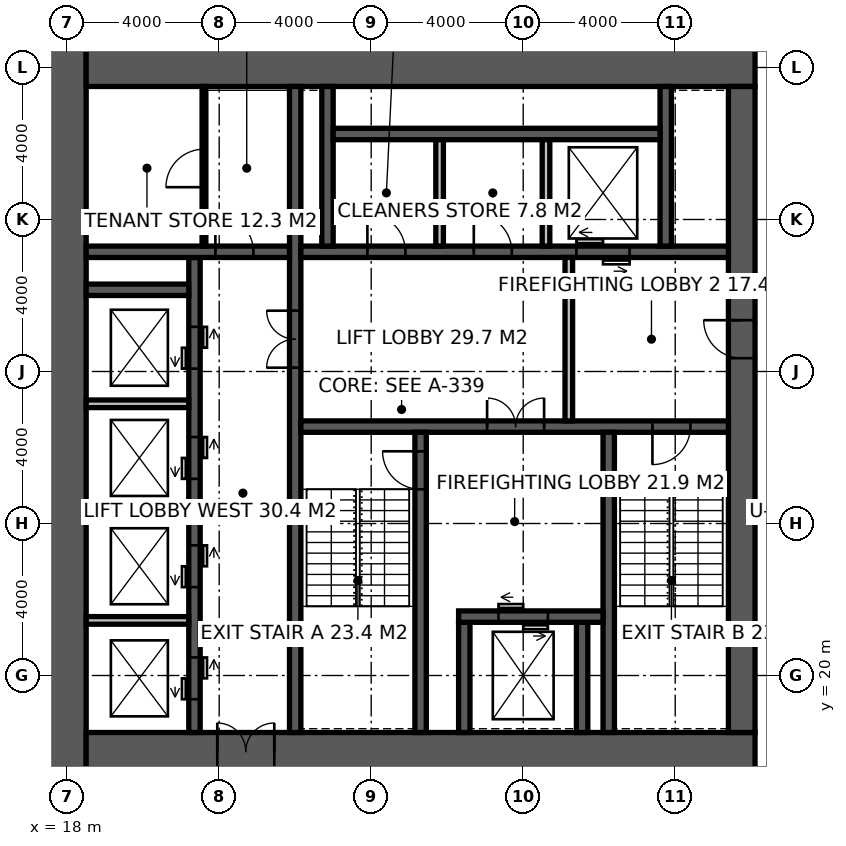
"""IFC4 building model, lengths in metres.
Left out: names, types, materials, properties, quantities, classifications, styles, units other than length and angle.
Written with IfcOpenShell. Run it as: python <this file> out.ifc"""

import sys

from ifc_helpers import new_model, si_unit, direction, frame, frame_2d, origin, place, context, subcontext, project, spatial, rectangle, extrude, element, fill, save


model = new_model("IFC4")
c1 = context("Model", 3, precision=1e-05, world=origin(), true_north=direction((0.0, 1.0)))
c2 = subcontext(c1, "Body", "Model", "MODEL_VIEW")
j1 = project(units=[si_unit("LENGTHUNIT", "METRE"), si_unit("PLANEANGLEUNIT", "RADIAN")], contexts=[c1])
p1 = place(None, origin())
s1 = spatial("IfcSite", under=j1, at=p1, CompositionType="ELEMENT")
p2 = place(p1, origin())
s2 = spatial("IfcBuilding", under=s1, at=p2, CompositionType="ELEMENT")
p3 = place(p2, frame((0.0, 0.0, 242.2)))
s3 = spatial("IfcBuildingStorey", under=s2, at=p3, CompositionType="ELEMENT", Elevation=242.2)
p4 = place(p3, frame((18.0, 17.5, -0.15), z_axis=(0.0, 0.0, 1.0), x_axis=(0.0, 1.0, 0.0)))
e1 = element("IfcWall", 1, at=p4, inside=s3, PredefinedType="SHEAR", context=c2, shape_type="SweptSolid", body=[
    extrude(rectangle(XDim=19.0, YDim=1.0, at=frame_2d((9.5, 0.0))), origin(), (0.0, 0.0, 1.0), 4.0),
])
p5 = place(p3, frame((18.5, 18.0, -0.15), z_axis=(0.0, 0.0, 1.0), x_axis=(1.0, 0.0, 0.0)))
e2 = element("IfcWall", 2, at=p5, inside=s3, PredefinedType="SHEAR", context=c2, shape_type="SweptSolid", body=[
    extrude(rectangle(XDim=17.6, YDim=1.0, at=frame_2d((8.8, 0.0))), origin(), (0.0, 0.0, 1.0), 4.0),
])
p6 = place(p5, frame((3.45, 0.0, 0.15)))
e3 = element("IfcOpeningElement", 3, at=p6, cuts=e2, PredefinedType="OPENING", context=c2, shape_type="SweptSolid", body=[
    extrude(rectangle(XDim=1.5, YDim=2.4, at=frame_2d((0.75, 1.2))), frame((0.0, 0.51, 0.0), z_axis=(0.0, -1.0, 0.0), x_axis=(1.0, 0.0, 0.0)), (0.0, 0.0, 1.0), 1.02),
])
p7 = place(p3, frame((18.5, 36.0, -0.15), z_axis=(0.0, 0.0, 1.0), x_axis=(1.0, 0.0, 0.0)))
e4 = element("IfcWall", 4, at=p7, inside=s3, PredefinedType="SHEAR", context=c2, shape_type="SweptSolid", body=[
    extrude(rectangle(XDim=17.6, YDim=1.0, at=frame_2d((8.8, 0.0))), origin(), (0.0, 0.0, 1.0), 4.0),
])
p8 = place(p3, frame((35.75, 18.5, -0.15), z_axis=(0.0, 0.0, 1.0), x_axis=(0.0, 1.0, 0.0)))
e5 = element("IfcWall", 5, at=p8, inside=s3, PredefinedType="SHEAR", context=c2, shape_type="SweptSolid", body=[
    extrude(rectangle(XDim=17.0, YDim=0.7, at=frame_2d((8.5, 0.0))), origin(), (0.0, 0.0, 1.0), 4.0),
])
p9 = place(p8, frame((9.85, 0.0, 0.15)))
e6 = element("IfcOpeningElement", 6, at=p9, cuts=e5, PredefinedType="OPENING", context=c2, shape_type="SweptSolid", body=[
    extrude(rectangle(XDim=1.0, YDim=2.2, at=frame_2d((0.5, 1.1))), frame((0.0, 0.36, 0.0), z_axis=(0.0, -1.0, 0.0), x_axis=(1.0, 0.0, 0.0)), (0.0, 0.0, 1.0), 0.72),
])
p10 = place(p3, frame((24.0, 18.5, -0.15), z_axis=(0.0, 0.0, 1.0), x_axis=(0.0, 1.0, 0.0)))
e7 = element("IfcWall", 7, at=p10, inside=s3, PredefinedType="SHEAR", context=c2, shape_type="SweptSolid", body=[
    extrude(rectangle(XDim=17.0, YDim=0.3, at=frame_2d((8.5, 0.0))), origin(), (0.0, 0.0, 1.0), 4.0),
])
p11 = place(p10, frame((9.6, 0.0, 0.15)))
e8 = element("IfcOpeningElement", 8, at=p11, cuts=e7, PredefinedType="OPENING", context=c2, shape_type="SweptSolid", body=[
    extrude(rectangle(XDim=1.5, YDim=2.4, at=frame_2d((0.75, 1.2))), frame((0.0, 0.16, 0.0), z_axis=(0.0, -1.0, 0.0), x_axis=(1.0, 0.0, 0.0)), (0.0, 0.0, 1.0), 0.32),
])
p12 = place(p3, frame((24.15, 26.55, -0.15), z_axis=(0.0, 0.0, 1.0), x_axis=(1.0, 0.0, 0.0)))
e9 = element("IfcWall", 9, at=p12, inside=s3, PredefinedType="SHEAR", context=c2, shape_type="SweptSolid", body=[
    extrude(rectangle(XDim=11.25, YDim=0.3, at=frame_2d((5.625, 0.0))), origin(), (0.0, 0.0, 1.0), 4.0),
])
p13 = place(p12, frame((9.25, 0.0, 0.15)))
e10 = element("IfcOpeningElement", 10, at=p13, cuts=e9, PredefinedType="OPENING", context=c2, shape_type="SweptSolid", body=[
    extrude(rectangle(XDim=1.0, YDim=2.2, at=frame_2d((0.5, 1.1))), frame((0.0, 0.16, 0.0), z_axis=(0.0, -1.0, 0.0), x_axis=(1.0, 0.0, 0.0)), (0.0, 0.0, 1.0), 0.32),
])
p14 = place(p12, frame((4.9, 0.0, 0.15)))
e11 = element("IfcOpeningElement", 11, at=p14, cuts=e9, PredefinedType="OPENING", context=c2, shape_type="SweptSolid", body=[
    extrude(rectangle(XDim=1.5, YDim=2.4, at=frame_2d((0.75, 1.2))), frame((0.0, 0.16, 0.0), z_axis=(0.0, -1.0, 0.0), x_axis=(1.0, 0.0, 0.0)), (0.0, 0.0, 1.0), 0.32),
])
p15 = place(p3, frame((27.3, 18.5, -0.15), z_axis=(0.0, 0.0, 1.0), x_axis=(0.0, 1.0, 0.0)))
e12 = element("IfcWall", 12, at=p15, inside=s3, PredefinedType="SHEAR", context=c2, shape_type="SweptSolid", body=[
    extrude(rectangle(XDim=7.9, YDim=0.3, at=frame_2d((3.95, 0.0))), origin(), (0.0, 0.0, 1.0), 4.0),
])
p16 = place(p15, frame((6.4, 0.0, 0.15)))
e13 = element("IfcOpeningElement", 13, at=p16, cuts=e12, PredefinedType="OPENING", context=c2, shape_type="SweptSolid", body=[
    extrude(rectangle(XDim=1.0, YDim=2.2, at=frame_2d((0.5, 1.1))), frame((0.0, 0.16, 0.0), z_axis=(0.0, -1.0, 0.0), x_axis=(1.0, 0.0, 0.0)), (0.0, 0.0, 1.0), 0.32),
])
p17 = place(p3, frame((32.25, 18.5, -0.15), z_axis=(0.0, 0.0, 1.0), x_axis=(0.0, 1.0, 0.0)))
e14 = element("IfcWall", 14, at=p17, inside=s3, PredefinedType="SHEAR", context=c2, shape_type="SweptSolid", body=[
    extrude(rectangle(XDim=7.9, YDim=0.3, at=frame_2d((3.95, 0.0))), origin(), (0.0, 0.0, 1.0), 4.0),
])
for number, where, z_axis, x_axis in (
    (15, (28.45, 18.5, -0.15), (0.0, 0.0, 1.0), (0.0, 1.0, 0.0)),
    (16, (31.55, 18.5, -0.15), (0.0, 0.0, 1.0), (0.0, 1.0, 0.0)),
):
    element("IfcWall", number, at=place(p3, frame(where, z_axis=z_axis, x_axis=x_axis)), inside=s3, PredefinedType="SHEAR", context=c2, shape_type="SweptSolid", body=[
        extrude(rectangle(XDim=2.9, YDim=0.3, at=frame_2d((1.45, 0.0))), origin(), (0.0, 0.0, 1.0), 4.0),
    ])
p18 = place(p3, frame((28.3, 21.55, -0.15), z_axis=(0.0, 0.0, 1.0), x_axis=(1.0, 0.0, 0.0)))
e17 = element("IfcWall", 17, at=p18, inside=s3, PredefinedType="SHEAR", context=c2, shape_type="SweptSolid", body=[
    extrude(rectangle(XDim=3.8, YDim=0.3, at=frame_2d((1.9, 0.0))), origin(), (0.0, 0.0, 1.0), 4.0),
])
p19 = place(p18, frame((1.05, 0.0, 0.15)))
e18 = element("IfcOpeningElement", 18, at=p19, cuts=e17, PredefinedType="OPENING", context=c2, shape_type="SweptSolid", body=[
    extrude(rectangle(XDim=1.3, YDim=2.4, at=frame_2d((0.65, 1.2))), frame((0.0, 0.16, 0.0), z_axis=(0.0, -1.0, 0.0), x_axis=(1.0, 0.0, 0.0)), (0.0, 0.0, 1.0), 0.32),
])
p20 = place(p3, frame((24.15, 31.15, -0.15), z_axis=(0.0, 0.0, 1.0), x_axis=(1.0, 0.0, 0.0)))
e19 = element("IfcWall", 19, at=p20, inside=s3, PredefinedType="SHEAR", context=c2, shape_type="SweptSolid", body=[
    extrude(rectangle(XDim=11.25, YDim=0.3, at=frame_2d((5.625, 0.0))), origin(), (0.0, 0.0, 1.0), 4.0),
])
p21 = place(p20, frame((1.75, 0.0, 0.15)))
e20 = element("IfcOpeningElement", 20, at=p21, cuts=e19, PredefinedType="OPENING", context=c2, shape_type="SweptSolid", body=[
    extrude(rectangle(XDim=1.0, YDim=2.2, at=frame_2d((0.5, 1.1))), frame((0.0, 0.16, 0.0), z_axis=(0.0, -1.0, 0.0), x_axis=(1.0, 0.0, 0.0)), (0.0, 0.0, 1.0), 0.32),
])
p22 = place(p20, frame((4.55, 0.0, 0.15)))
e21 = element("IfcOpeningElement", 21, at=p22, cuts=e19, PredefinedType="OPENING", context=c2, shape_type="SweptSolid", body=[
    extrude(rectangle(XDim=1.0, YDim=2.2, at=frame_2d((0.5, 1.1))), frame((0.0, 0.16, 0.0), z_axis=(0.0, -1.0, 0.0), x_axis=(1.0, 0.0, 0.0)), (0.0, 0.0, 1.0), 0.32),
])
p23 = place(p20, frame((7.25, 0.0, 0.15)))
e22 = element("IfcOpeningElement", 22, at=p23, cuts=e19, PredefinedType="OPENING", context=c2, shape_type="SweptSolid", body=[
    extrude(rectangle(XDim=1.4, YDim=2.4, at=frame_2d((0.7, 1.2))), frame((0.0, 0.16, 0.0), z_axis=(0.0, -1.0, 0.0), x_axis=(1.0, 0.0, 0.0)), (0.0, 0.0, 1.0), 0.32),
])
p24 = place(p3, frame((21.35, 18.5, -0.15), z_axis=(0.0, 0.0, 1.0), x_axis=(0.0, 1.0, 0.0)))
e23 = element("IfcWall", 23, at=p24, inside=s3, PredefinedType="SHEAR", context=c2, shape_type="SweptSolid", body=[
    extrude(rectangle(XDim=12.5, YDim=0.3, at=frame_2d((6.25, 0.0))), origin(), (0.0, 0.0, 1.0), 4.0),
])
p25 = place(p24, frame((0.875, 0.0, 0.15)))
e24 = element("IfcOpeningElement", 24, at=p25, cuts=e23, PredefinedType="OPENING", context=c2, shape_type="SweptSolid", body=[
    extrude(rectangle(XDim=1.1, YDim=2.2, at=frame_2d((0.55, 1.1))), frame((0.0, 0.16, 0.0), z_axis=(0.0, -1.0, 0.0), x_axis=(1.0, 0.0, 0.0)), (0.0, 0.0, 1.0), 0.32),
])
p26 = place(p24, frame((3.825, 0.0, 0.15)))
e25 = element("IfcOpeningElement", 25, at=p26, cuts=e23, PredefinedType="OPENING", context=c2, shape_type="SweptSolid", body=[
    extrude(rectangle(XDim=1.1, YDim=2.2, at=frame_2d((0.55, 1.1))), frame((0.0, 0.16, 0.0), z_axis=(0.0, -1.0, 0.0), x_axis=(1.0, 0.0, 0.0)), (0.0, 0.0, 1.0), 0.32),
])
p27 = place(p24, frame((6.675, 0.0, 0.15)))
e26 = element("IfcOpeningElement", 26, at=p27, cuts=e23, PredefinedType="OPENING", context=c2, shape_type="SweptSolid", body=[
    extrude(rectangle(XDim=1.1, YDim=2.2, at=frame_2d((0.55, 1.1))), frame((0.0, 0.16, 0.0), z_axis=(0.0, -1.0, 0.0), x_axis=(1.0, 0.0, 0.0)), (0.0, 0.0, 1.0), 0.32),
])
p28 = place(p24, frame((9.575, 0.0, 0.15)))
e27 = element("IfcOpeningElement", 27, at=p28, cuts=e23, PredefinedType="OPENING", context=c2, shape_type="SweptSolid", body=[
    extrude(rectangle(XDim=1.1, YDim=2.2, at=frame_2d((0.55, 1.1))), frame((0.0, 0.16, 0.0), z_axis=(0.0, -1.0, 0.0), x_axis=(1.0, 0.0, 0.0)), (0.0, 0.0, 1.0), 0.32),
])
p29 = place(p3, frame((18.5, 31.15, -0.15), z_axis=(0.0, 0.0, 1.0), x_axis=(1.0, 0.0, 0.0)))
e28 = element("IfcWall", 28, at=p29, inside=s3, PredefinedType="SHEAR", context=c2, shape_type="SweptSolid", body=[
    extrude(rectangle(XDim=5.35, YDim=0.3, at=frame_2d((2.675, 0.0))), origin(), (0.0, 0.0, 1.0), 4.0),
])
p30 = place(p29, frame((3.4, 0.0, 0.15)))
e29 = element("IfcOpeningElement", 29, at=p30, cuts=e28, PredefinedType="OPENING", context=c2, shape_type="SweptSolid", body=[
    extrude(rectangle(XDim=1.0, YDim=2.2, at=frame_2d((0.5, 1.1))), frame((0.0, 0.16, 0.0), z_axis=(0.0, -1.0, 0.0), x_axis=(1.0, 0.0, 0.0)), (0.0, 0.0, 1.0), 0.32),
])
p31 = place(p3, frame((18.5, 30.15, -0.15), z_axis=(0.0, 0.0, 1.0), x_axis=(1.0, 0.0, 0.0)))
e30 = element("IfcWall", 30, at=p31, inside=s3, PredefinedType="SHEAR", context=c2, shape_type="SweptSolid", body=[
    extrude(rectangle(XDim=2.7, YDim=0.3, at=frame_2d((1.35, 0.0))), origin(), (0.0, 0.0, 1.0), 4.0),
])
for number, where, z_axis, x_axis in (
    (31, (24.85, 31.3, -0.15), (0.0, 0.0, 1.0), (0.0, 1.0, 0.0)),
    (32, (33.75, 31.3, -0.15), (0.0, 0.0, 1.0), (0.0, 1.0, 0.0)),
):
    element("IfcWall", number, at=place(p3, frame(where, z_axis=z_axis, x_axis=x_axis)), inside=s3, PredefinedType="SHEAR", context=c2, shape_type="SweptSolid", body=[
        extrude(rectangle(XDim=4.2, YDim=0.3, at=frame_2d((2.1, 0.0))), origin(), (0.0, 0.0, 1.0), 4.0),
    ])
p32 = place(p3, frame((25.0, 34.25, -0.15), z_axis=(0.0, 0.0, 1.0), x_axis=(1.0, 0.0, 0.0)))
e33 = element("IfcWall", 33, at=p32, inside=s3, PredefinedType="SHEAR", context=c2, shape_type="SweptSolid", body=[
    extrude(rectangle(XDim=8.6, YDim=0.3, at=frame_2d((4.3, 0.0))), origin(), (0.0, 0.0, 1.0), 4.0),
])
p33 = place(p3, frame((27.8, 31.3, 0.0), z_axis=(0.0, 0.0, 1.0), x_axis=(0.0, 1.0, 0.0)))
e34 = element("IfcWall", 34, at=p33, inside=s3, PredefinedType="SOLIDWALL", context=c2, shape_type="SweptSolid", body=[
    extrude(rectangle(XDim=2.8, YDim=0.2, at=frame_2d((1.4, 0.0))), origin(), (0.0, 0.0, 1.0), 3.85),
])
p34 = place(p3, frame((30.6, 31.3, -0.15), z_axis=(0.0, 0.0, 1.0), x_axis=(0.0, 1.0, 0.0)))
e35 = element("IfcWall", 35, at=p34, inside=s3, PredefinedType="SOLIDWALL", context=c2, shape_type="SweptSolid", body=[
    extrude(rectangle(XDim=2.8, YDim=0.2, at=frame_2d((1.4, 0.0))), origin(), (0.0, 0.0, 1.0), 4.0),
])
for number, where, z_axis, x_axis in (
    (36, (18.5, 21.45, -0.15), (0.0, 0.0, 1.0), (1.0, 0.0, 0.0)),
    (37, (18.5, 24.3, -0.15), (0.0, 0.0, 1.0), (1.0, 0.0, 0.0)),
    (38, (18.5, 27.15, -0.15), (0.0, 0.0, 1.0), (1.0, 0.0, 0.0)),
):
    element("IfcWall", number, at=place(p3, frame(where, z_axis=z_axis, x_axis=x_axis)), inside=s3, PredefinedType="SOLIDWALL", context=c2, shape_type="SweptSolid", body=[
        extrude(rectangle(XDim=2.7, YDim=0.2, at=frame_2d((1.35, 0.0))), origin(), (0.0, 0.0, 1.0), 4.0),
    ])
p35 = place(p3, frame((31.2, 26.7, 0.0), z_axis=(0.0, 0.0, 1.0), x_axis=(0.0, 1.0, 0.0)))
e39 = element("IfcWall", 39, at=p35, inside=s3, PredefinedType="SOLIDWALL", context=c2, shape_type="SweptSolid", body=[
    extrude(rectangle(XDim=4.3, YDim=0.2, at=frame_2d((2.15, 0.0))), origin(), (0.0, 0.0, 1.0), 3.85),
])
p36 = place(p3, frame((21.6, 31.3, 0.0), z_axis=(0.0, 0.0, 1.0), x_axis=(0.0, 1.0, 0.0)))
e40 = element("IfcWall", 40, at=p36, inside=s3, PredefinedType="PARTITIONING", context=c2, shape_type="SweptSolid", body=[
    extrude(rectangle(XDim=4.2, YDim=0.1, at=frame_2d((2.1, 0.0))), origin(), (0.0, 0.0, 1.0), 3.85),
])
p37 = place(p36, frame((1.55, 0.0, 0.0)))
e41 = element("IfcOpeningElement", 41, at=p37, cuts=e40, PredefinedType="OPENING", context=c2, shape_type="SweptSolid", body=[
    extrude(rectangle(XDim=1.0, YDim=2.2, at=frame_2d((0.5, 1.1))), frame((0.0, 0.06, 0.0), z_axis=(0.0, -1.0, 0.0), x_axis=(1.0, 0.0, 0.0)), (0.0, 0.0, 1.0), 0.12),
])
p38 = place(p16, origin())
e42 = element("IfcDoor", 42, at=p38, inside=s3, OperationType="SINGLE_SWING_RIGHT", PredefinedType="DOOR", context=c2, shape_type="SweptSolid", body=[
    extrude(rectangle(XDim=1.0, YDim=2.2, at=frame_2d((0.5, 1.1))), frame((0.0, 0.025, 0.0), z_axis=(0.0, -1.0, 0.0), x_axis=(1.0, 0.0, 0.0)), (0.0, 0.0, 1.0), 0.05),
])
fill(e13, e42)
p39 = place(p13, frame((1.0, 0.0, 0.0), z_axis=(0.0, 0.0, 1.0), x_axis=(-1.0, 0.0, 0.0)))
e43 = element("IfcDoor", 43, at=p39, inside=s3, OperationType="SINGLE_SWING_RIGHT", PredefinedType="DOOR", context=c2, shape_type="SweptSolid", body=[
    extrude(rectangle(XDim=1.0, YDim=2.2, at=frame_2d((0.5, 1.1))), frame((0.0, 0.025, 0.0), z_axis=(0.0, -1.0, 0.0), x_axis=(1.0, 0.0, 0.0)), (0.0, 0.0, 1.0), 0.05),
])
fill(e10, e43)
p40 = place(p9, origin())
e44 = element("IfcDoor", 44, at=p40, inside=s3, OperationType="SINGLE_SWING_RIGHT", PredefinedType="DOOR", context=c2, shape_type="SweptSolid", body=[
    extrude(rectangle(XDim=1.0, YDim=2.2, at=frame_2d((0.5, 1.1))), frame((0.0, 0.025, 0.0), z_axis=(0.0, -1.0, 0.0), x_axis=(1.0, 0.0, 0.0)), (0.0, 0.0, 1.0), 0.05),
])
fill(e6, e44)
p41 = place(p14, origin())
e45 = element("IfcDoor", 45, at=p41, inside=s3, OperationType="DOUBLE_DOOR_DOUBLE_SWING", PredefinedType="DOOR", context=c2, shape_type="SweptSolid", body=[
    extrude(rectangle(XDim=1.5, YDim=2.4, at=frame_2d((0.75, 1.2))), frame((0.0, 0.025, 0.0), z_axis=(0.0, -1.0, 0.0), x_axis=(1.0, 0.0, 0.0)), (0.0, 0.0, 1.0), 0.05),
])
fill(e11, e45)
p42 = place(p11, origin())
e46 = element("IfcDoor", 46, at=p42, inside=s3, OperationType="DOUBLE_DOOR_DOUBLE_SWING", PredefinedType="DOOR", context=c2, shape_type="SweptSolid", body=[
    extrude(rectangle(XDim=1.5, YDim=2.4, at=frame_2d((0.75, 1.2))), frame((0.0, 0.025, 0.0), z_axis=(0.0, -1.0, 0.0), x_axis=(1.0, 0.0, 0.0)), (0.0, 0.0, 1.0), 0.05),
])
fill(e8, e46)
p43 = place(p30, origin())
e47 = element("IfcDoor", 47, at=p43, inside=s3, OperationType="SINGLE_SWING_LEFT", PredefinedType="DOOR", context=c2, shape_type="SweptSolid", body=[
    extrude(rectangle(XDim=1.0, YDim=2.2, at=frame_2d((0.5, 1.1))), frame((0.0, 0.025, 0.0), z_axis=(0.0, -1.0, 0.0), x_axis=(1.0, 0.0, 0.0)), (0.0, 0.0, 1.0), 0.05),
])
fill(e29, e47)
p44 = place(p37, origin())
e48 = element("IfcDoor", 48, at=p44, inside=s3, OperationType="SINGLE_SWING_LEFT", PredefinedType="DOOR", context=c2, shape_type="SweptSolid", body=[
    extrude(rectangle(XDim=1.0, YDim=2.2, at=frame_2d((0.5, 1.1))), frame((0.0, 0.025, 0.0), z_axis=(0.0, -1.0, 0.0), x_axis=(1.0, 0.0, 0.0)), (0.0, 0.0, 1.0), 0.05),
])
fill(e41, e48)
p45 = place(p21, origin())
e49 = element("IfcDoor", 49, at=p45, inside=s3, OperationType="SINGLE_SWING_LEFT", PredefinedType="DOOR", context=c2, shape_type="SweptSolid", body=[
    extrude(rectangle(XDim=1.0, YDim=2.2, at=frame_2d((0.5, 1.1))), frame((0.0, 0.025, 0.0), z_axis=(0.0, -1.0, 0.0), x_axis=(1.0, 0.0, 0.0)), (0.0, 0.0, 1.0), 0.05),
])
fill(e20, e49)
p46 = place(p22, origin())
e50 = element("IfcDoor", 50, at=p46, inside=s3, OperationType="SINGLE_SWING_LEFT", PredefinedType="DOOR", context=c2, shape_type="SweptSolid", body=[
    extrude(rectangle(XDim=1.0, YDim=2.2, at=frame_2d((0.5, 1.1))), frame((0.0, 0.025, 0.0), z_axis=(0.0, -1.0, 0.0), x_axis=(1.0, 0.0, 0.0)), (0.0, 0.0, 1.0), 0.05),
])
fill(e21, e50)
p47 = place(p6, origin())
e51 = element("IfcDoor", 51, at=p47, inside=s3, OperationType="DOUBLE_DOOR_DOUBLE_SWING", PredefinedType="DOOR", context=c2, shape_type="SweptSolid", body=[
    extrude(rectangle(XDim=1.5, YDim=2.4, at=frame_2d((0.75, 1.2))), frame((0.0, 0.025, 0.0), z_axis=(0.0, -1.0, 0.0), x_axis=(1.0, 0.0, 0.0)), (0.0, 0.0, 1.0), 0.05),
])
fill(e3, e51)
p48 = place(p19, origin())
e52 = element("IfcDoor", 52, at=p48, inside=s3, OperationType="DOUBLE_DOOR_SLIDING", PredefinedType="DOOR", context=c2, shape_type="SweptSolid", body=[
    extrude(rectangle(XDim=1.3, YDim=2.4, at=frame_2d((0.65, 1.2))), frame((0.0, 0.025, 0.0), z_axis=(0.0, -1.0, 0.0), x_axis=(1.0, 0.0, 0.0)), (0.0, 0.0, 1.0), 0.05),
])
fill(e18, e52)
p49 = place(p23, origin())
e53 = element("IfcDoor", 53, at=p49, inside=s3, OperationType="DOUBLE_DOOR_SLIDING", PredefinedType="DOOR", context=c2, shape_type="SweptSolid", body=[
    extrude(rectangle(XDim=1.4, YDim=2.4, at=frame_2d((0.7, 1.2))), frame((0.0, 0.025, 0.0), z_axis=(0.0, -1.0, 0.0), x_axis=(1.0, 0.0, 0.0)), (0.0, 0.0, 1.0), 0.05),
])
fill(e22, e53)
p50 = place(p25, origin())
e54 = element("IfcDoor", 54, at=p50, inside=s3, OperationType="DOUBLE_DOOR_SLIDING", PredefinedType="DOOR", context=c2, shape_type="SweptSolid", body=[
    extrude(rectangle(XDim=1.1, YDim=2.2, at=frame_2d((0.55, 1.1))), frame((0.0, 0.025, 0.0), z_axis=(0.0, -1.0, 0.0), x_axis=(1.0, 0.0, 0.0)), (0.0, 0.0, 1.0), 0.05),
])
fill(e24, e54)
p51 = place(p26, origin())
e55 = element("IfcDoor", 55, at=p51, inside=s3, OperationType="DOUBLE_DOOR_SLIDING", PredefinedType="DOOR", context=c2, shape_type="SweptSolid", body=[
    extrude(rectangle(XDim=1.1, YDim=2.2, at=frame_2d((0.55, 1.1))), frame((0.0, 0.025, 0.0), z_axis=(0.0, -1.0, 0.0), x_axis=(1.0, 0.0, 0.0)), (0.0, 0.0, 1.0), 0.05),
])
fill(e25, e55)
p52 = place(p27, origin())
e56 = element("IfcDoor", 56, at=p52, inside=s3, OperationType="DOUBLE_DOOR_SLIDING", PredefinedType="DOOR", context=c2, shape_type="SweptSolid", body=[
    extrude(rectangle(XDim=1.1, YDim=2.2, at=frame_2d((0.55, 1.1))), frame((0.0, 0.025, 0.0), z_axis=(0.0, -1.0, 0.0), x_axis=(1.0, 0.0, 0.0)), (0.0, 0.0, 1.0), 0.05),
])
fill(e26, e56)
p53 = place(p28, origin())
e57 = element("IfcDoor", 57, at=p53, inside=s3, OperationType="DOUBLE_DOOR_SLIDING", PredefinedType="DOOR", context=c2, shape_type="SweptSolid", body=[
    extrude(rectangle(XDim=1.1, YDim=2.2, at=frame_2d((0.55, 1.1))), frame((0.0, 0.025, 0.0), z_axis=(0.0, -1.0, 0.0), x_axis=(1.0, 0.0, 0.0)), (0.0, 0.0, 1.0), 0.05),
])
fill(e27, e57)
save(model, sys.argv[1])
